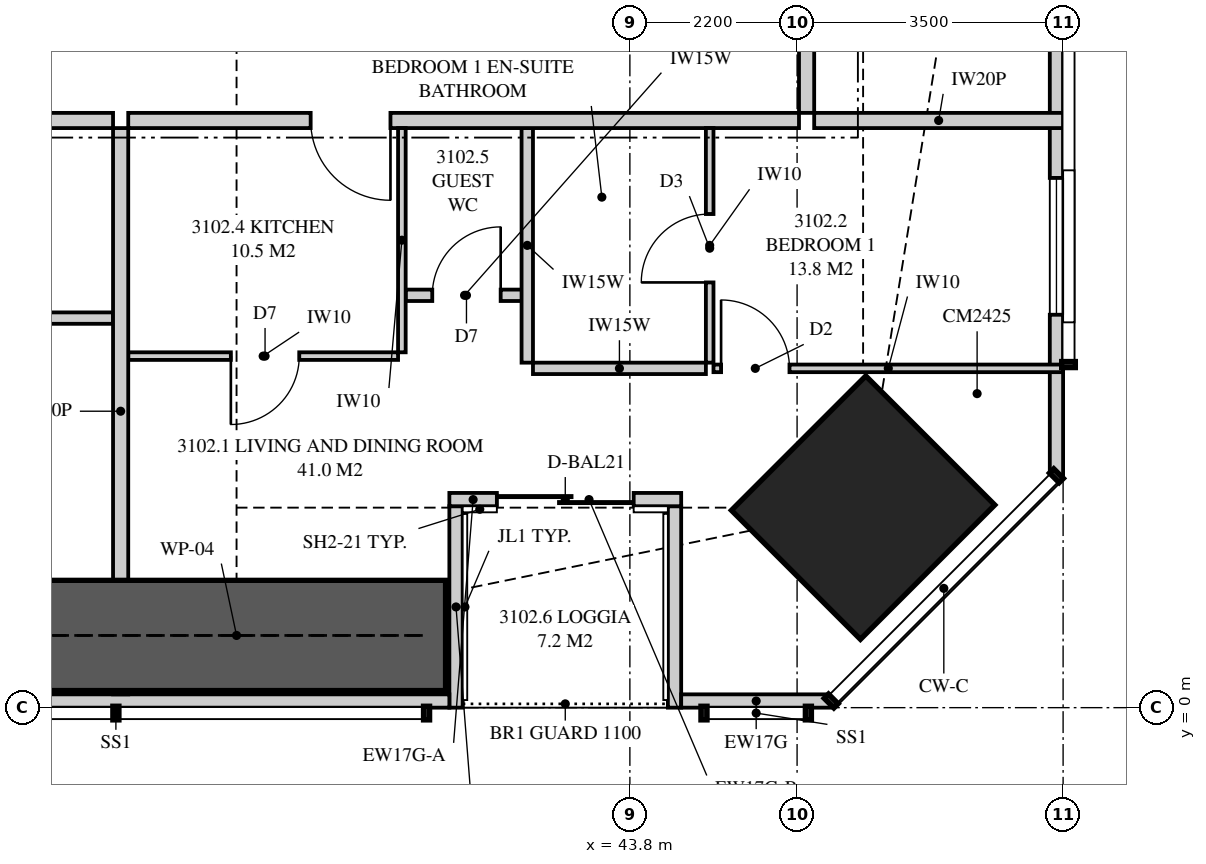
"""IFC4 building model, lengths in metres.
Left out: names, types, materials, properties, quantities, classifications, styles, units other than length and angle.
Written with IfcOpenShell. Run it as: python <this file> out.ifc"""

import sys

from ifc_helpers import new_model, si_unit, direction, frame, frame_2d, origin, origin_2d, place, context, subcontext, project, spatial, polyline, rectangle, outline, extrude, element, fill, save


model = new_model("IFC4")
c1 = context("Model", 3, precision=1e-05, world=origin(), true_north=direction((0.0, 1.0)))
c2 = subcontext(c1, "Body", "Model", "MODEL_VIEW")
j1 = project(units=[si_unit("LENGTHUNIT", "METRE"), si_unit("PLANEANGLEUNIT", "RADIAN")], contexts=[c1])
p1 = place(None, origin())
s1 = spatial("IfcSite", under=j1, at=p1, CompositionType="ELEMENT")
p2 = place(p1, origin())
s2 = spatial("IfcBuilding", under=s1, at=p2, CompositionType="ELEMENT")
p3 = place(p2, frame((0.0, 0.0, 114.9)))
s3 = spatial("IfcBuildingStorey", under=s2, at=p3, CompositionType="ELEMENT", Elevation=114.9)
p4 = place(p3, frame((46.869, 2.631, 0.0), z_axis=(0.0, 0.0, 1.0), x_axis=(-0.707106781187, 0.707106781187, 0.0)))
e1 = element("IfcColumn", 1, at=p4, inside=s3, PredefinedType="COLUMN", context=c2, shape_type="SweptSolid", body=[
    extrude(rectangle(XDim=2.4, YDim=2.5, at=origin_2d()), origin(), (0.0, 0.0, 1.0), 3.35),
])
p5 = place(p3, frame((14.051, 0.087, 0.0), z_axis=(0.0, 0.0, 1.0), x_axis=(1.0, 0.0, 0.0)))
e2 = element("IfcWall", 2, at=p5, inside=s3, PredefinedType="SOLIDWALL", context=c2, shape_type="SweptSolid", body=[
    extrude(outline(polyline([(0.0, 0.0), (27.374, 0.0), (27.374, 3.11), (24.777, 3.11), (24.777, 2.15), (24.732, 2.15), (24.732, 3.11), (24.574, 3.11), (24.574, 2.15), (2.824, 2.15), (2.824, 3.11), (2.666, 3.11), (2.666, 2.15), (2.62, 2.15), (2.62, 3.11), (0.0, 3.11), (0.0, 0.0)])), frame((0.0, 0.087, 0.0), z_axis=(0.0, -1.0, 0.0), x_axis=(1.0, 0.0, 0.0)), (0.0, 0.0, 1.0), 0.175),
])
p6 = place(p5, frame((5.874, 0.0, 0.4)))
e3 = element("IfcOpeningElement", 3, at=p6, cuts=e2, PredefinedType="OPENING", context=c2, shape_type="SweptSolid", body=[
    extrude(rectangle(XDim=1.8, YDim=1.7, at=frame_2d((0.9, 0.85))), frame((0.0, 0.097, 0.0), z_axis=(0.0, -1.0, 0.0), x_axis=(1.0, 0.0, 0.0)), (0.0, 0.0, 1.0), 0.195),
])
p7 = place(p5, frame((9.04, 0.0, 0.4)))
e4 = element("IfcOpeningElement", 4, at=p7, cuts=e2, PredefinedType="OPENING", context=c2, shape_type="SweptSolid", body=[
    extrude(rectangle(XDim=1.8, YDim=1.7, at=frame_2d((0.9, 0.85))), frame((0.0, 0.097, 0.0), z_axis=(0.0, -1.0, 0.0), x_axis=(1.0, 0.0, 0.0)), (0.0, 0.0, 1.0), 0.195),
])
p8 = place(p5, frame((16.564, 0.0, 0.4)))
e5 = element("IfcOpeningElement", 5, at=p8, cuts=e2, PredefinedType="OPENING", context=c2, shape_type="SweptSolid", body=[
    extrude(rectangle(XDim=1.8, YDim=1.7, at=frame_2d((0.9, 0.85))), frame((0.0, 0.097, 0.0), z_axis=(0.0, -1.0, 0.0), x_axis=(1.0, 0.0, 0.0)), (0.0, 0.0, 1.0), 0.195),
])
p9 = place(p5, frame((19.889, 0.0, 0.4)))
e6 = element("IfcOpeningElement", 6, at=p9, cuts=e2, PredefinedType="OPENING", context=c2, shape_type="SweptSolid", body=[
    extrude(rectangle(XDim=1.8, YDim=1.7, at=frame_2d((0.9, 0.85))), frame((0.0, 0.097, 0.0), z_axis=(0.0, -1.0, 0.0), x_axis=(1.0, 0.0, 0.0)), (0.0, 0.0, 1.0), 0.195),
])
p10 = place(p3, frame((44.475, 0.087, 0.0), z_axis=(0.0, 0.0, 1.0), x_axis=(1.0, 0.0, 0.0)))
e7 = element("IfcWall", 7, at=p10, inside=s3, PredefinedType="SOLIDWALL", context=c2, shape_type="SweptSolid", body=[
    extrude(rectangle(XDim=1.974, YDim=0.175, at=frame_2d((0.987, 0.0))), origin(), (0.0, 0.0, 1.0), 3.11),
])
p11 = place(p3, frame((41.425, 2.738, 0.0), z_axis=(0.0, 0.0, 1.0), x_axis=(1.0, 0.0, 0.0)))
e8 = element("IfcWall", 8, at=p11, inside=s3, PredefinedType="SOLIDWALL", context=c2, shape_type="SweptSolid", body=[
    extrude(rectangle(XDim=0.625, YDim=0.175, at=frame_2d((0.312, 0.0))), origin(), (0.0, 0.0, 1.0), 2.51),
])
p12 = place(p3, frame((42.05, 2.738, 0.0), z_axis=(0.0, 0.0, 1.0), x_axis=(1.0, 0.0, 0.0)))
e9 = element("IfcWall", 9, at=p12, inside=s3, PredefinedType="SOLIDWALL", context=c2, shape_type="SweptSolid", body=[
    extrude(rectangle(XDim=2.425, YDim=0.175, at=frame_2d((1.212, 0.0))), origin(), (0.0, 0.0, 1.0), 2.15),
])
p13 = place(p12, origin())
e10 = element("IfcOpeningElement", 10, at=p13, cuts=e9, PredefinedType="OPENING", context=c2, shape_type="SweptSolid", body=[
    extrude(rectangle(XDim=1.8, YDim=2.1, at=frame_2d((0.9, 1.05))), frame((0.0, 0.097, 0.0), z_axis=(0.0, -1.0, 0.0), x_axis=(1.0, 0.0, 0.0)), (0.0, 0.0, 1.0), 0.195),
])
p14 = place(p3, frame((41.512, 0.0, 0.0), z_axis=(0.0, 0.0, 1.0), x_axis=(0.0, 1.0, 0.0)))
e11 = element("IfcWall", 11, at=p14, inside=s3, PredefinedType="SOLIDWALL", context=c2, shape_type="SweptSolid", body=[
    extrude(outline(polyline([(0.0, 0.0), (2.65, 0.0), (2.65, 2.51), (2.373, 2.51), (2.373, 2.15), (0.705, 2.15), (0.705, 3.11), (0.0, 3.11), (0.0, 0.0)])), frame((0.0, 0.087, 0.0), z_axis=(0.0, -1.0, 0.0), x_axis=(1.0, 0.0, 0.0)), (0.0, 0.0, 1.0), 0.175),
])
p15 = place(p3, frame((44.387, 0.0, 0.0), z_axis=(0.0, 0.0, 1.0), x_axis=(0.0, 1.0, 0.0)))
e12 = element("IfcWall", 12, at=p15, inside=s3, PredefinedType="SOLIDWALL", context=c2, shape_type="SweptSolid", body=[
    extrude(outline(polyline([(0.0, 0.0), (2.65, 0.0), (2.65, 2.15), (1.291, 2.15), (1.291, 3.11), (0.0, 3.11), (0.0, 0.0)])), frame((0.0, 0.087, 0.0), z_axis=(0.0, -1.0, 0.0), x_axis=(1.0, 0.0, 0.0)), (0.0, 0.0, 1.0), 0.175),
])
p16 = place(p3, frame((49.413, 3.051, 0.0), z_axis=(0.0, 0.0, 1.0), x_axis=(0.0, 1.0, 0.0)))
e13 = element("IfcWall", 13, at=p16, inside=s3, PredefinedType="SOLIDWALL", context=c2, shape_type="SweptSolid", body=[
    extrude(outline(polyline([(0.0, 0.0), (31.897, 0.0), (31.897, 3.11), (22.167, 3.11), (22.167, 2.15), (22.074, 2.15), (22.074, 3.11), (21.949, 3.11), (21.949, 2.15), (9.949, 2.15), (9.949, 3.11), (9.823, 3.11), (9.823, 2.15), (9.73, 2.15), (9.73, 3.11), (0.0, 3.11), (0.0, 0.0)])), frame((0.0, 0.087, 0.0), z_axis=(0.0, -1.0, 0.0), x_axis=(1.0, 0.0, 0.0)), (0.0, 0.0, 1.0), 0.175),
])
p17 = place(p16, frame((2.118, 0.0, 0.4)))
e14 = element("IfcOpeningElement", 14, at=p17, cuts=e13, PredefinedType="OPENING", context=c2, shape_type="SweptSolid", body=[
    extrude(rectangle(XDim=1.8, YDim=1.7, at=frame_2d((0.9, 0.85))), frame((0.0, 0.097, 0.0), z_axis=(0.0, -1.0, 0.0), x_axis=(1.0, 0.0, 0.0)), (0.0, 0.0, 1.0), 0.195),
])
p18 = place(p16, frame((14.849, 0.0, 0.4)))
e15 = element("IfcOpeningElement", 15, at=p18, cuts=e13, PredefinedType="OPENING", context=c2, shape_type="SweptSolid", body=[
    extrude(rectangle(XDim=1.2, YDim=1.7, at=frame_2d((0.6, 0.85))), frame((0.0, 0.097, 0.0), z_axis=(0.0, -1.0, 0.0), x_axis=(1.0, 0.0, 0.0)), (0.0, 0.0, 1.0), 0.195),
])
p19 = place(p16, frame((27.479, 0.0, 0.4)))
e16 = element("IfcOpeningElement", 16, at=p19, cuts=e13, PredefinedType="OPENING", context=c2, shape_type="SweptSolid", body=[
    extrude(rectangle(XDim=1.8, YDim=1.7, at=frame_2d((0.9, 0.85))), frame((0.0, 0.097, 0.0), z_axis=(0.0, -1.0, 0.0), x_axis=(1.0, 0.0, 0.0)), (0.0, 0.0, 1.0), 0.195),
])
p20 = place(p3, frame((37.1, 0.175, 0.0), z_axis=(0.0, 0.0, 1.0), x_axis=(0.0, 1.0, 0.0)))
e17 = element("IfcWall", 17, at=p20, inside=s3, PredefinedType="PARTITIONING", context=c2, shape_type="SweptSolid", body=[
    extrude(outline(polyline([(0.529, 2.15), (0.0, 2.15), (0.0, 0.0), (0.529, 0.0), (0.529, 0.462), (1.021, 0.462), (1.021, 0.0), (7.45, 0.0), (7.45, 3.11), (1.685, 3.11), (1.685, 2.15), (1.021, 2.15), (1.021, 1.688), (0.529, 1.688), (0.529, 2.15)])), frame((0.0, 0.1, 0.0), z_axis=(0.0, -1.0, 0.0), x_axis=(1.0, 0.0, 0.0)), (0.0, 0.0, 1.0), 0.2),
])
p21 = place(p3, frame((17.775, 7.725, 0.0), z_axis=(0.0, 0.0, 1.0), x_axis=(1.0, 0.0, 0.0)))
e18 = element("IfcWall", 18, at=p21, inside=s3, PredefinedType="PARTITIONING", context=c2, shape_type="SweptSolid", body=[
    extrude(outline(polyline([(0.0, 0.0), (19.225, 0.0), (19.225, 3.11), (10.312, 3.11), (10.312, 2.541), (9.638, 2.541), (9.638, 3.11), (0.0, 3.11), (0.0, 0.0)])), frame((0.0, 0.1, 0.0), z_axis=(0.0, -1.0, 0.0), x_axis=(1.0, 0.0, 0.0)), (0.0, 0.0, 1.0), 0.2),
])
p22 = place(p21, frame((3.275, 0.0, 0.0)))
e19 = element("IfcOpeningElement", 19, at=p22, cuts=e18, PredefinedType="OPENING", context=c2, shape_type="SweptSolid", body=[
    extrude(rectangle(XDim=1.05, YDim=2.2, at=frame_2d((0.525, 1.1))), frame((0.0, 0.11, 0.0), z_axis=(0.0, -1.0, 0.0), x_axis=(1.0, 0.0, 0.0)), (0.0, 0.0, 1.0), 0.22),
])
p23 = place(p3, frame((32.95, 5.125, 0.0), z_axis=(0.0, 0.0, 1.0), x_axis=(1.0, 0.0, 0.0)))
e20 = element("IfcWall", 20, at=p23, inside=s3, PredefinedType="PLUMBINGWALL", context=c2, shape_type="SweptSolid", body=[
    extrude(rectangle(XDim=4.05, YDim=0.15, at=frame_2d((2.025, 0.0))), origin(), (0.0, 0.0, 1.0), 3.11),
])
p24 = place(p23, frame((0.4, 0.0, 0.0)))
e21 = element("IfcOpeningElement", 21, at=p24, cuts=e20, PredefinedType="OPENING", context=c2, shape_type="SweptSolid", body=[
    extrude(rectangle(XDim=0.9, YDim=2.1, at=frame_2d((0.45, 1.05))), frame((0.0, 0.085, 0.0), z_axis=(0.0, -1.0, 0.0), x_axis=(1.0, 0.0, 0.0)), (0.0, 0.0, 1.0), 0.17),
])
p25 = place(p3, frame((37.2, 7.725, 0.0), z_axis=(0.0, 0.0, 1.0), x_axis=(1.0, 0.0, 0.0)))
e22 = element("IfcWall", 22, at=p25, inside=s3, PredefinedType="PARTITIONING", context=c2, shape_type="SweptSolid", body=[
    extrude(outline(polyline([(0.0, 0.0), (8.825, 0.0), (8.825, 3.11), (1.762, 3.11), (1.762, 2.541), (1.088, 2.541), (1.088, 3.11), (0.0, 3.11), (0.0, 0.0)])), frame((0.0, 0.1, 0.0), z_axis=(0.0, -1.0, 0.0), x_axis=(1.0, 0.0, 0.0)), (0.0, 0.0, 1.0), 0.2),
])
p26 = place(p25, frame((2.4, 0.0, 0.0)))
e23 = element("IfcOpeningElement", 23, at=p26, cuts=e22, PredefinedType="OPENING", context=c2, shape_type="SweptSolid", body=[
    extrude(rectangle(XDim=1.05, YDim=2.2, at=frame_2d((0.525, 1.1))), frame((0.0, 0.11, 0.0), z_axis=(0.0, -1.0, 0.0), x_axis=(1.0, 0.0, 0.0)), (0.0, 0.0, 1.0), 0.22),
])
p27 = place(p3, frame((44.85, 4.539, 0.0), z_axis=(0.0, 0.0, 1.0), x_axis=(0.0, 1.0, 0.0)))
e24 = element("IfcWall", 24, at=p27, inside=s3, PredefinedType="PARTITIONING", context=c2, shape_type="SweptSolid", body=[
    extrude(rectangle(XDim=3.086, YDim=0.1, at=frame_2d((1.543, 0.0))), origin(), (0.0, 0.0, 1.0), 3.11),
])
p28 = place(p27, frame((1.056, 0.0, 0.0)))
e25 = element("IfcOpeningElement", 25, at=p28, cuts=e24, PredefinedType="OPENING", context=c2, shape_type="SweptSolid", body=[
    extrude(rectangle(XDim=0.9, YDim=2.1, at=frame_2d((0.45, 1.05))), frame((0.0, 0.06, 0.0), z_axis=(0.0, -1.0, 0.0), x_axis=(1.0, 0.0, 0.0)), (0.0, 0.0, 1.0), 0.12),
])
p29 = place(p3, frame((44.9, 4.464, 0.0), z_axis=(0.0, 0.0, 1.0), x_axis=(1.0, 0.0, 0.0)))
e26 = element("IfcWall", 26, at=p29, inside=s3, PredefinedType="PARTITIONING", context=c2, shape_type="SweptSolid", body=[
    extrude(outline(polyline([(0.0, 0.0), (4.6, 0.0), (4.6, 3.11), (3.137, 3.11), (3.137, 2.15), (1.395, 2.15), (1.395, 3.11), (0.0, 3.11), (0.0, 0.0)])), frame((0.0, 0.05, 0.0), z_axis=(0.0, -1.0, 0.0), x_axis=(1.0, 0.0, 0.0)), (0.0, 0.0, 1.0), 0.1),
])
p30 = place(p29, frame((0.1, 0.0, 0.0)))
e27 = element("IfcOpeningElement", 27, at=p30, cuts=e26, PredefinedType="OPENING", context=c2, shape_type="SweptSolid", body=[
    extrude(rectangle(XDim=0.9, YDim=2.1, at=frame_2d((0.45, 1.05))), frame((0.0, 0.06, 0.0), z_axis=(0.0, -1.0, 0.0), x_axis=(1.0, 0.0, 0.0)), (0.0, 0.0, 1.0), 0.12),
])
p31 = place(p3, frame((42.525, 4.464, 0.0), z_axis=(0.0, 0.0, 1.0), x_axis=(1.0, 0.0, 0.0)))
e28 = element("IfcWall", 28, at=p31, inside=s3, PredefinedType="PLUMBINGWALL", context=c2, shape_type="SweptSolid", body=[
    extrude(rectangle(XDim=2.275, YDim=0.15, at=frame_2d((1.138, 0.0))), origin(), (0.0, 0.0, 1.0), 3.11),
])
p32 = place(p3, frame((42.45, 4.539, 0.0), z_axis=(0.0, 0.0, 1.0), x_axis=(0.0, 1.0, 0.0)))
e29 = element("IfcWall", 29, at=p32, inside=s3, PredefinedType="PLUMBINGWALL", context=c2, shape_type="SweptSolid", body=[
    extrude(rectangle(XDim=3.086, YDim=0.15, at=frame_2d((1.543, 0.0))), origin(), (0.0, 0.0, 1.0), 3.11),
])
p33 = place(p3, frame((37.2, 4.625, 0.0), z_axis=(0.0, 0.0, 1.0), x_axis=(1.0, 0.0, 0.0)))
e30 = element("IfcWall", 30, at=p33, inside=s3, PredefinedType="PARTITIONING", context=c2, shape_type="SweptSolid", body=[
    extrude(outline(polyline([(0.0, 0.0), (3.55, 0.0), (3.55, 3.11), (1.712, 3.11), (1.712, 2.541), (1.138, 2.541), (1.138, 3.11), (0.0, 3.11), (0.0, 0.0)])), frame((0.0, 0.05, 0.0), z_axis=(0.0, -1.0, 0.0), x_axis=(1.0, 0.0, 0.0)), (0.0, 0.0, 1.0), 0.1),
])
p34 = place(p33, frame((1.35, 0.0, 0.0)))
e31 = element("IfcOpeningElement", 31, at=p34, cuts=e30, PredefinedType="OPENING", context=c2, shape_type="SweptSolid", body=[
    extrude(rectangle(XDim=0.9, YDim=2.1, at=frame_2d((0.45, 1.05))), frame((0.0, 0.06, 0.0), z_axis=(0.0, -1.0, 0.0), x_axis=(1.0, 0.0, 0.0)), (0.0, 0.0, 1.0), 0.12),
])
p35 = place(p3, frame((40.8, 4.675, 0.0), z_axis=(0.0, 0.0, 1.0), x_axis=(0.0, 1.0, 0.0)))
e32 = element("IfcWall", 32, at=p35, inside=s3, PredefinedType="PARTITIONING", context=c2, shape_type="SweptSolid", body=[
    extrude(rectangle(XDim=2.95, YDim=0.1, at=frame_2d((1.475, 0.0))), origin(), (0.0, 0.0, 1.0), 3.11),
])
p36 = place(p3, frame((40.85, 5.425, 0.0), z_axis=(0.0, 0.0, 1.0), x_axis=(1.0, 0.0, 0.0)))
e33 = element("IfcWall", 33, at=p36, inside=s3, PredefinedType="PLUMBINGWALL", context=c2, shape_type="SweptSolid", body=[
    extrude(rectangle(XDim=1.55, YDim=0.15, at=frame_2d((0.775, 0.0))), origin(), (0.0, 0.0, 1.0), 3.11),
])
p37 = place(p36, frame((0.35, 0.0, 0.0)))
e34 = element("IfcOpeningElement", 34, at=p37, cuts=e33, PredefinedType="OPENING", context=c2, shape_type="SweptSolid", body=[
    extrude(rectangle(XDim=0.9, YDim=2.1, at=frame_2d((0.45, 1.05))), frame((0.0, 0.085, 0.0), z_axis=(0.0, -1.0, 0.0), x_axis=(1.0, 0.0, 0.0)), (0.0, 0.0, 1.0), 0.17),
])
p38 = place(p3, frame((46.225, 7.725, 0.0), z_axis=(0.0, 0.0, 1.0), x_axis=(1.0, 0.0, 0.0)))
e35 = element("IfcWall", 35, at=p38, inside=s3, PredefinedType="PARTITIONING", context=c2, shape_type="SweptSolid", body=[
    extrude(outline(polyline([(0.0, 0.0), (3.275, 0.0), (3.275, 3.11), (2.392, 3.11), (2.392, 2.15), (0.643, 2.15), (0.643, 2.541), (0.306, 2.541), (0.306, 3.11), (0.0, 3.11), (0.0, 0.0)])), frame((0.0, 0.1, 0.0), z_axis=(0.0, -1.0, 0.0), x_axis=(1.0, 0.0, 0.0)), (0.0, 0.0, 1.0), 0.2),
])
p39 = place(p3, frame((46.125, 7.825, 0.0), z_axis=(0.0, 0.0, 1.0), x_axis=(0.0, 1.0, 0.0)))
e36 = element("IfcWall", 36, at=p39, inside=s3, PredefinedType="PARTITIONING", context=c2, shape_type="SweptSolid", body=[
    extrude(outline(polyline([(0.0, 0.0), (8.475, 0.0), (8.475, 3.11), (5.512, 3.11), (5.512, 2.541), (4.838, 2.541), (4.838, 3.11), (0.0, 3.11), (0.0, 0.0)])), frame((0.0, 0.1, 0.0), z_axis=(0.0, -1.0, 0.0), x_axis=(1.0, 0.0, 0.0)), (0.0, 0.0, 1.0), 0.2),
])
p40 = place(p3, frame((35.875, 0.95, 0.0), z_axis=(0.0, 0.0, 1.0), x_axis=(1.0, 0.0, 0.0)))
e37 = element("IfcWall", 37, at=p40, inside=s3, PredefinedType="SHEAR", context=c2, shape_type="SweptSolid", body=[
    extrude(rectangle(XDim=5.5, YDim=1.45, at=frame_2d((2.75, 0.0))), origin(), (0.0, 0.0, 1.0), 3.35),
])
p41 = place(p13, origin())
e38 = element("IfcDoor", 38, at=p41, inside=s3, OperationType="SLIDING_TO_LEFT", PredefinedType="DOOR", context=c2, shape_type="SweptSolid", body=[
    extrude(rectangle(XDim=1.8, YDim=2.1, at=frame_2d((0.9, 1.05))), frame((0.0, 0.025, 0.0), z_axis=(0.0, -1.0, 0.0), x_axis=(1.0, 0.0, 0.0)), (0.0, 0.0, 1.0), 0.05),
])
fill(e10, e38)
p42 = place(p17, origin())
e39 = element("IfcWindow", 39, at=p42, inside=s3, PartitioningType="SINGLE_PANEL", PredefinedType="WINDOW", context=c2, shape_type="SweptSolid", body=[
    extrude(rectangle(XDim=1.8, YDim=1.7, at=frame_2d((0.9, 0.85))), frame((0.0, 0.03, 0.0), z_axis=(0.0, -1.0, 0.0), x_axis=(1.0, 0.0, 0.0)), (0.0, 0.0, 1.0), 0.06),
])
fill(e14, e39)
p43 = place(p26, frame((1.05, 0.0, 0.0), z_axis=(0.0, 0.0, 1.0), x_axis=(-1.0, 0.0, 0.0)))
e40 = element("IfcDoor", 40, at=p43, inside=s3, OperationType="SINGLE_SWING_LEFT", PredefinedType="DOOR", context=c2, shape_type="SweptSolid", body=[
    extrude(rectangle(XDim=1.05, YDim=2.2, at=frame_2d((0.525, 1.1))), frame((0.0, 0.025, 0.0), z_axis=(0.0, -1.0, 0.0), x_axis=(1.0, 0.0, 0.0)), (0.0, 0.0, 1.0), 0.05),
])
fill(e23, e40)
p44 = place(p30, origin())
e41 = element("IfcDoor", 41, at=p44, inside=s3, OperationType="SINGLE_SWING_LEFT", PredefinedType="DOOR", context=c2, shape_type="SweptSolid", body=[
    extrude(rectangle(XDim=0.9, YDim=2.1, at=frame_2d((0.45, 1.05))), frame((0.0, 0.025, 0.0), z_axis=(0.0, -1.0, 0.0), x_axis=(1.0, 0.0, 0.0)), (0.0, 0.0, 1.0), 0.05),
])
fill(e27, e41)
p45 = place(p28, origin())
e42 = element("IfcDoor", 42, at=p45, inside=s3, OperationType="SINGLE_SWING_LEFT", PredefinedType="DOOR", context=c2, shape_type="SweptSolid", body=[
    extrude(rectangle(XDim=0.9, YDim=2.1, at=frame_2d((0.45, 1.05))), frame((0.0, 0.025, 0.0), z_axis=(0.0, -1.0, 0.0), x_axis=(1.0, 0.0, 0.0)), (0.0, 0.0, 1.0), 0.05),
])
fill(e25, e42)
p46 = place(p34, frame((0.9, 0.0, 0.0), z_axis=(0.0, 0.0, 1.0), x_axis=(-1.0, 0.0, 0.0)))
e43 = element("IfcDoor", 43, at=p46, inside=s3, OperationType="SINGLE_SWING_RIGHT", PredefinedType="DOOR", context=c2, shape_type="SweptSolid", body=[
    extrude(rectangle(XDim=0.9, YDim=2.1, at=frame_2d((0.45, 1.05))), frame((0.0, 0.025, 0.0), z_axis=(0.0, -1.0, 0.0), x_axis=(1.0, 0.0, 0.0)), (0.0, 0.0, 1.0), 0.05),
])
fill(e31, e43)
p47 = place(p37, origin())
e44 = element("IfcDoor", 44, at=p47, inside=s3, OperationType="SINGLE_SWING_RIGHT", PredefinedType="DOOR", context=c2, shape_type="SweptSolid", body=[
    extrude(rectangle(XDim=0.9, YDim=2.1, at=frame_2d((0.45, 1.05))), frame((0.0, 0.025, 0.0), z_axis=(0.0, -1.0, 0.0), x_axis=(1.0, 0.0, 0.0)), (0.0, 0.0, 1.0), 0.05),
])
fill(e34, e44)
save(model, sys.argv[1])
